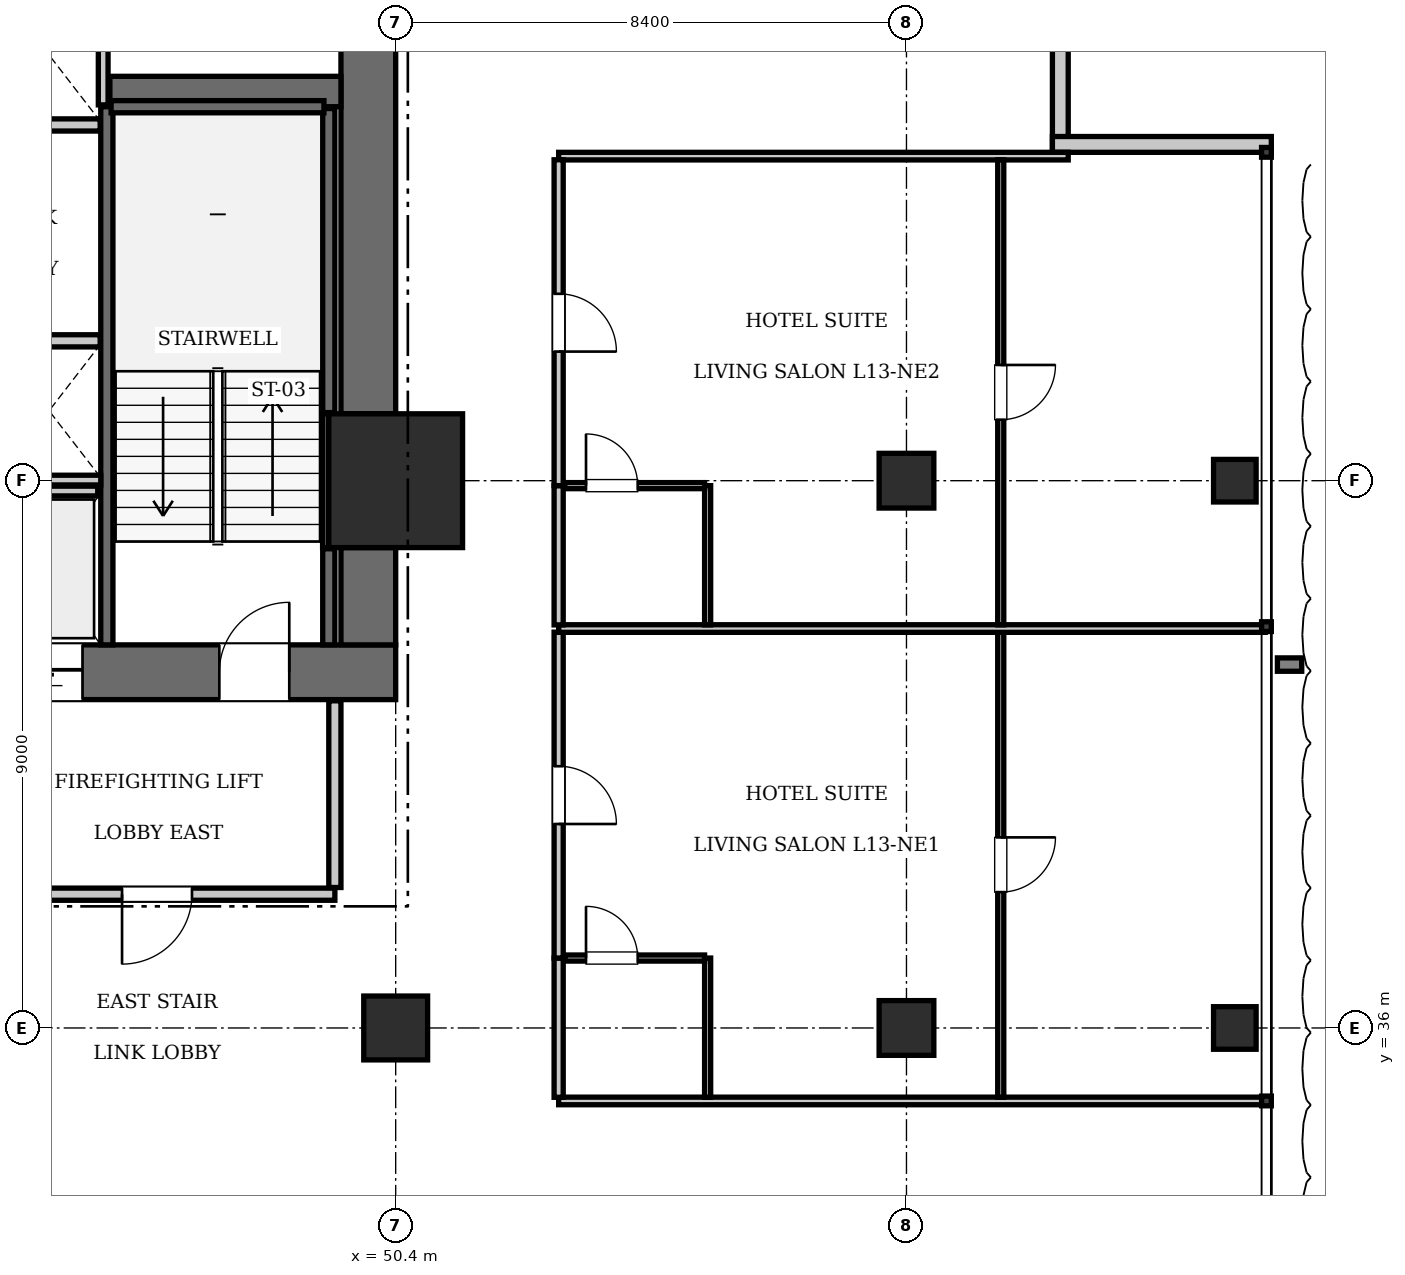
"""IFC4 building model, lengths in metres.
Left out: names, types, materials, properties, quantities, classifications, styles, units other than length and angle.
Written with IfcOpenShell. Run it as: python <this file> out.ifc"""

import sys

from ifc_helpers import new_model, si_unit, direction, frame, frame_2d, origin, origin_2d, place, context, subcontext, project, spatial, rectangle, i_section, extrude, element, fill, save


model = new_model("IFC4")
c1 = context("Model", 3, precision=1e-05, world=origin(), true_north=direction((0.0, 1.0)))
c2 = subcontext(c1, "Body", "Model", "MODEL_VIEW")
j1 = project(units=[si_unit("LENGTHUNIT", "METRE"), si_unit("PLANEANGLEUNIT", "RADIAN")], contexts=[c1])
p1 = place(None, origin())
s1 = spatial("IfcSite", under=j1, at=p1, CompositionType="ELEMENT")
p2 = place(p1, origin())
s2 = spatial("IfcBuilding", under=s1, at=p2, CompositionType="ELEMENT")
p3 = place(p2, frame((0.0, 0.0, 57.75)))
s3 = spatial("IfcBuildingStorey", under=s2, at=p3, CompositionType="ELEMENT", Elevation=57.75)
p4 = place(p3, frame((50.4, 45.0, 0.0), z_axis=(0.0, 0.0, 1.0), x_axis=(1.0, 0.0, 0.0)))
e1 = element("IfcColumn", 1, at=p4, inside=s3, PredefinedType="COLUMN", context=c2, shape_type="SweptSolid", body=[
    extrude(rectangle(XDim=2.2, YDim=2.2, at=origin_2d()), origin(), (0.0, 0.0, 1.0), 3.85),
])
p5 = place(p3, frame((43.6, 41.85, 0.0), z_axis=(0.0, 0.0, 1.0), x_axis=(1.0, 0.0, 0.0)))
e2 = element("IfcWall", 2, at=p5, inside=s3, PredefinedType="SHEAR", context=c2, shape_type="SweptSolid", body=[
    extrude(rectangle(XDim=6.8, YDim=0.9, at=frame_2d((3.4, 0.0))), origin(), (0.0, 0.0, 1.0), 3.85),
])
p6 = place(p5, frame((3.9, 0.0, 0.0)))
e3 = element("IfcOpeningElement", 3, at=p6, cuts=e2, PredefinedType="OPENING", context=c2, shape_type="SweptSolid", body=[
    extrude(rectangle(XDim=1.15, YDim=2.15, at=frame_2d((0.575, 1.075))), frame((0.0, 0.46, 0.0), z_axis=(0.0, -1.0, 0.0), x_axis=(1.0, 0.0, 0.0)), (0.0, 0.0, 1.0), 0.92),
])
p7 = place(p5, frame((0.55, 0.0, 0.0)))
e4 = element("IfcOpeningElement", 4, at=p7, cuts=e2, PredefinedType="OPENING", context=c2, shape_type="SweptSolid", body=[
    extrude(rectangle(XDim=1.1, YDim=2.2, at=frame_2d((0.55, 1.1))), frame((0.0, 0.46, 0.0), z_axis=(0.0, -1.0, 0.0), x_axis=(1.0, 0.0, 0.0)), (0.0, 0.0, 1.0), 0.92),
])
p8 = place(p3, frame((49.95, 42.3, 0.0), z_axis=(0.0, 0.0, 1.0), x_axis=(0.0, 1.0, 0.0)))
e5 = element("IfcWall", 5, at=p8, inside=s3, PredefinedType="SHEAR", context=c2, shape_type="SweptSolid", body=[
    extrude(rectangle(XDim=1.6, YDim=0.9, at=frame_2d((0.8, 0.0))), origin(), (0.0, 0.0, 1.0), 3.85),
])
p9 = place(p3, frame((49.95, 46.1, 0.0), z_axis=(0.0, 0.0, 1.0), x_axis=(0.0, 1.0, 0.0)))
e6 = element("IfcWall", 6, at=p9, inside=s3, PredefinedType="SHEAR", context=c2, shape_type="SweptSolid", body=[
    extrude(rectangle(XDim=7.0, YDim=0.9, at=frame_2d((3.5, 0.0))), origin(), (0.0, 0.0, 1.0), 3.85),
])
p10 = place(p3, frame((45.7, 51.4, 0.0), z_axis=(0.0, 0.0, 1.0), x_axis=(1.0, 0.0, 0.0)))
e7 = element("IfcWall", 7, at=p10, inside=s3, PredefinedType="SHEAR", context=c2, shape_type="SweptSolid", body=[
    extrude(rectangle(XDim=3.8, YDim=0.5, at=frame_2d((1.9, 0.0))), origin(), (0.0, 0.0, 1.0), 3.85),
])
p11 = place(p3, frame((50.4, 36.0, 0.0), z_axis=(0.0, 0.0, 1.0), x_axis=(1.0, 0.0, 0.0)))
e8 = element("IfcColumn", 8, at=p11, inside=s3, PredefinedType="COLUMN", context=c2, shape_type="SweptSolid", body=[
    extrude(rectangle(XDim=1.05, YDim=1.05, at=origin_2d()), origin(), (0.0, 0.0, 1.0), 3.85),
])
for number, where, z_axis, x_axis in (
    (9, (58.8, 36.0, 0.0), (0.0, 0.0, 1.0), (1.0, 0.0, 0.0)),
    (10, (58.8, 45.0, 0.0), (0.0, 0.0, 1.0), (1.0, 0.0, 0.0)),
):
    element("IfcColumn", number, at=place(p3, frame(where, z_axis=z_axis, x_axis=x_axis)), inside=s3, PredefinedType="COLUMN", context=c2, shape_type="SweptSolid", body=[
        extrude(rectangle(XDim=0.9, YDim=0.9, at=origin_2d()), origin(), (0.0, 0.0, 1.0), 3.85),
    ])
for number, where, z_axis, x_axis in (
    (11, (64.2, 36.0, 0.0), (0.0, 0.0, 1.0), (1.0, 0.0, 0.0)),
    (12, (64.2, 45.0, 0.0), (0.0, 0.0, 1.0), (1.0, 0.0, 0.0)),
):
    element("IfcColumn", number, at=place(p3, frame(where, z_axis=z_axis, x_axis=x_axis)), inside=s3, PredefinedType="COLUMN", context=c2, shape_type="SweptSolid", body=[
        extrude(i_section(OverallWidth=0.7, OverallDepth=0.7, WebThickness=0.028, FlangeThickness=0.044, at=origin_2d()), origin(), (0.0, 0.0, 1.0), 3.85),
    ])
p12 = place(p3, frame((45.65, 42.3, 0.0), z_axis=(0.0, 0.0, 1.0), x_axis=(0.0, 1.0, 0.0)))
e13 = element("IfcWall", 13, at=p12, inside=s3, PredefinedType="SOLIDWALL", context=c2, shape_type="SweptSolid", body=[
    extrude(rectangle(XDim=8.85, YDim=0.2, at=frame_2d((4.425, 0.0))), origin(), (0.0, 0.0, 1.0), 3.61),
])
p13 = place(p3, frame((49.3, 42.3, 0.0), z_axis=(0.0, 0.0, 1.0), x_axis=(0.0, 1.0, 0.0)))
e14 = element("IfcWall", 14, at=p13, inside=s3, PredefinedType="SOLIDWALL", context=c2, shape_type="SweptSolid", body=[
    extrude(rectangle(XDim=1.58, YDim=0.2, at=frame_2d((0.79, 0.0))), origin(), (0.0, 0.0, 1.0), 3.61),
])
p14 = place(p3, frame((49.3, 46.12, 0.0), z_axis=(0.0, 0.0, 1.0), x_axis=(0.0, 1.0, 0.0)))
e15 = element("IfcWall", 15, at=p14, inside=s3, PredefinedType="SOLIDWALL", context=c2, shape_type="SweptSolid", body=[
    extrude(rectangle(XDim=5.0, YDim=0.2, at=frame_2d((2.5, 0.0))), origin(), (0.0, 0.0, 1.0), 3.61),
])
p15 = place(p3, frame((45.72, 51.15, 0.0), z_axis=(0.0, 0.0, 1.0), x_axis=(1.0, 0.0, 0.0)))
e16 = element("IfcWall", 16, at=p15, inside=s3, PredefinedType="SOLIDWALL", context=c2, shape_type="SweptSolid", body=[
    extrude(rectangle(XDim=3.5, YDim=0.2, at=frame_2d((1.75, 0.0))), origin(), (0.0, 0.0, 1.0), 3.61),
])
p16 = place(p3, frame((49.248, 43.9, 0.0), z_axis=(0.0, 0.0, 1.0), x_axis=(0.0, 1.0, 0.0)))
e17 = element("IfcWall", 17, at=p16, inside=s3, PredefinedType="SOLIDWALL", context=c2, shape_type="SweptSolid", body=[
    extrude(rectangle(XDim=2.2, YDim=0.1, at=frame_2d((1.1, 0.0))), origin(), (0.0, 0.0, 1.0), 3.61),
])
for number, where, z_axis, x_axis in (
    (18, (43.86, 47.3, 0.0), (0.0, 0.0, 1.0), (1.0, 0.0, 0.0)),
    (19, (43.86, 50.85, 0.0), (0.0, 0.0, 1.0), (1.0, 0.0, 0.0)),
):
    element("IfcWall", number, at=place(p3, frame(where, z_axis=z_axis, x_axis=x_axis)), inside=s3, PredefinedType="SOLIDWALL", context=c2, shape_type="SweptSolid", body=[
        extrude(rectangle(XDim=1.68, YDim=0.2, at=frame_2d((0.84, 0.0))), origin(), (0.0, 0.0, 1.0), 3.61),
    ])
p17 = place(p3, frame((43.9, 44.83, 0.0), z_axis=(0.0, 0.0, 1.0), x_axis=(1.0, 0.0, 0.0)))
e20 = element("IfcWall", 20, at=p17, inside=s3, PredefinedType="SOLIDWALL", context=c2, shape_type="SweptSolid", body=[
    extrude(rectangle(XDim=1.6, YDim=0.16, at=frame_2d((0.8, 0.0))), origin(), (0.0, 0.0, 1.0), 3.61),
])
p18 = place(p3, frame((42.1, 45.01, 0.0), z_axis=(0.0, 0.0, 1.0), x_axis=(1.0, 0.0, 0.0)))
e21 = element("IfcWall", 21, at=p18, inside=s3, PredefinedType="SOLIDWALL", context=c2, shape_type="SweptSolid", body=[
    extrude(rectangle(XDim=3.45, YDim=0.16, at=frame_2d((1.725, 0.0))), origin(), (0.0, 0.0, 1.0), 3.61),
])
p19 = place(p3, frame((45.59, 51.18, 0.0), z_axis=(0.0, 0.0, 1.0), x_axis=(0.0, 1.0, 0.0)))
e22 = element("IfcWall", 22, at=p19, inside=s3, PredefinedType="SOLIDWALL", context=c2, shape_type="SweptSolid", body=[
    extrude(rectangle(XDim=1.92, YDim=0.16, at=frame_2d((0.96, 0.0))), origin(), (0.0, 0.0, 1.0), 3.61),
])
for number, where, z_axis, x_axis in (
    (23, (61.33, 54.0, 0.0), (0.0, 0.0, 1.0), (0.0, -1.0, 0.0)),
    (24, (61.2, 50.53, 0.0), (0.0, 0.0, 1.0), (1.0, 0.0, 0.0)),
):
    element("IfcWall", number, at=place(p3, frame(where, z_axis=z_axis, x_axis=x_axis)), inside=s3, PredefinedType="SOLIDWALL", context=c2, shape_type="SweptSolid", body=[
        extrude(rectangle(XDim=3.6, YDim=0.26, at=frame_2d((1.8, 0.0))), origin(), (0.0, 0.0, 1.0), 3.61),
    ])
p20 = place(p3, frame((43.6, 38.2, 0.0), z_axis=(0.0, 0.0, 1.0), x_axis=(1.0, 0.0, 0.0)))
e25 = element("IfcWall", 25, at=p20, inside=s3, PredefinedType="PARTITIONING", context=c2, shape_type="SweptSolid", body=[
    extrude(rectangle(XDim=5.8, YDim=0.2, at=frame_2d((2.9, 0.0))), origin(), (0.0, 0.0, 1.0), 3.61),
])
p21 = place(p20, frame((2.3, 0.0, 0.0)))
e26 = element("IfcOpeningElement", 26, at=p21, cuts=e25, PredefinedType="OPENING", context=c2, shape_type="SweptSolid", body=[
    extrude(rectangle(XDim=1.15, YDim=2.15, at=frame_2d((0.575, 1.075))), frame((0.0, 0.11, 0.0), z_axis=(0.0, -1.0, 0.0), x_axis=(1.0, 0.0, 0.0)), (0.0, 0.0, 1.0), 0.22),
])
p22 = place(p3, frame((49.4, 38.31, 0.0), z_axis=(0.0, 0.0, 1.0), x_axis=(0.0, 1.0, 0.0)))
e27 = element("IfcWall", 27, at=p22, inside=s3, PredefinedType="PARTITIONING", context=c2, shape_type="SweptSolid", body=[
    extrude(rectangle(XDim=3.07, YDim=0.2, at=frame_2d((1.535, 0.0))), origin(), (0.0, 0.0, 1.0), 3.61),
])
p23 = place(p3, frame((53.08, 34.8, 0.0), z_axis=(0.0, 0.0, 1.0), x_axis=(1.0, 0.0, 0.0)))
e28 = element("IfcWall", 28, at=p23, inside=s3, PredefinedType="PARTITIONING", context=c2, shape_type="SweptSolid", body=[
    extrude(rectangle(XDim=11.62, YDim=0.125, at=frame_2d((5.81, 0.0))), origin(), (0.0, 0.0, 1.0), 3.61),
])
p24 = place(p3, frame((53.08, 50.337, 0.0), z_axis=(0.0, 0.0, 1.0), x_axis=(1.0, 0.0, 0.0)))
e29 = element("IfcWall", 29, at=p24, inside=s3, PredefinedType="PARTITIONING", context=c2, shape_type="SweptSolid", body=[
    extrude(rectangle(XDim=8.38, YDim=0.125, at=frame_2d((4.19, 0.0))), origin(), (0.0, 0.0, 1.0), 3.61),
])
p25 = place(p3, frame((53.08, 34.86, 0.0), z_axis=(0.0, 0.0, 1.0), x_axis=(0.0, 1.0, 0.0)))
e30 = element("IfcWall", 30, at=p25, inside=s3, PredefinedType="PARTITIONING", context=c2, shape_type="SweptSolid", body=[
    extrude(rectangle(XDim=2.29, YDim=0.15, at=frame_2d((1.145, 0.0))), origin(), (0.0, 0.0, 1.0), 3.61),
])
p26 = place(p3, frame((53.08, 37.15, 0.0), z_axis=(0.0, 0.0, 1.0), x_axis=(0.0, 1.0, 0.0)))
e31 = element("IfcWall", 31, at=p26, inside=s3, PredefinedType="PARTITIONING", context=c2, shape_type="SweptSolid", body=[
    extrude(rectangle(XDim=5.359, YDim=0.15, at=frame_2d((2.679, 0.0))), origin(), (0.0, 0.0, 1.0), 3.61),
])
p27 = place(p26, frame((2.204, 0.0, 0.0)))
e32 = element("IfcOpeningElement", 32, at=p27, cuts=e31, PredefinedType="OPENING", context=c2, shape_type="SweptSolid", body=[
    extrude(rectangle(XDim=0.95, YDim=2.15, at=frame_2d((0.475, 1.075))), frame((0.0, 0.085, 0.0), z_axis=(0.0, -1.0, 0.0), x_axis=(1.0, 0.0, 0.0)), (0.0, 0.0, 1.0), 0.17),
])
p28 = place(p3, frame((55.53, 34.86, 0.0), z_axis=(0.0, 0.0, 1.0), x_axis=(0.0, 1.0, 0.0)))
e33 = element("IfcWall", 33, at=p28, inside=s3, PredefinedType="PARTITIONING", context=c2, shape_type="SweptSolid", body=[
    extrude(rectangle(XDim=2.29, YDim=0.1, at=frame_2d((1.145, 0.0))), origin(), (0.0, 0.0, 1.0), 3.61),
])
p29 = place(p3, frame((53.18, 37.15, 0.0), z_axis=(0.0, 0.0, 1.0), x_axis=(1.0, 0.0, 0.0)))
e34 = element("IfcWall", 34, at=p29, inside=s3, PredefinedType="PARTITIONING", context=c2, shape_type="SweptSolid", body=[
    extrude(rectangle(XDim=2.3, YDim=0.1, at=frame_2d((1.15, 0.0))), origin(), (0.0, 0.0, 1.0), 3.61),
])
p30 = place(p29, frame((0.35, 0.0, 0.0)))
e35 = element("IfcOpeningElement", 35, at=p30, cuts=e34, PredefinedType="OPENING", context=c2, shape_type="SweptSolid", body=[
    extrude(rectangle(XDim=0.85, YDim=2.1, at=frame_2d((0.425, 1.05))), frame((0.0, 0.06, 0.0), z_axis=(0.0, -1.0, 0.0), x_axis=(1.0, 0.0, 0.0)), (0.0, 0.0, 1.0), 0.12),
])
p31 = place(p3, frame((60.35, 34.86, 0.0), z_axis=(0.0, 0.0, 1.0), x_axis=(0.0, 1.0, 0.0)))
e36 = element("IfcWall", 36, at=p31, inside=s3, PredefinedType="PARTITIONING", context=c2, shape_type="SweptSolid", body=[
    extrude(rectangle(XDim=7.649, YDim=0.1, at=frame_2d((3.824, 0.0))), origin(), (0.0, 0.0, 1.0), 3.61),
])
p32 = place(p31, frame((3.374, 0.0, 0.0)))
e37 = element("IfcOpeningElement", 37, at=p32, cuts=e36, PredefinedType="OPENING", context=c2, shape_type="SweptSolid", body=[
    extrude(rectangle(XDim=0.9, YDim=2.1, at=frame_2d((0.45, 1.05))), frame((0.0, 0.06, 0.0), z_axis=(0.0, -1.0, 0.0), x_axis=(1.0, 0.0, 0.0)), (0.0, 0.0, 1.0), 0.12),
])
p33 = place(p3, frame((53.08, 42.569, 0.0), z_axis=(0.0, 0.0, 1.0), x_axis=(1.0, 0.0, 0.0)))
e38 = element("IfcWall", 38, at=p33, inside=s3, PredefinedType="PARTITIONING", context=c2, shape_type="SweptSolid", body=[
    extrude(rectangle(XDim=11.62, YDim=0.125, at=frame_2d((5.81, 0.0))), origin(), (0.0, 0.0, 1.0), 3.61),
])
p34 = place(p3, frame((53.08, 42.629, 0.0), z_axis=(0.0, 0.0, 1.0), x_axis=(0.0, 1.0, 0.0)))
e39 = element("IfcWall", 39, at=p34, inside=s3, PredefinedType="PARTITIONING", context=c2, shape_type="SweptSolid", body=[
    extrude(rectangle(XDim=2.29, YDim=0.15, at=frame_2d((1.145, 0.0))), origin(), (0.0, 0.0, 1.0), 3.61),
])
p35 = place(p3, frame((53.08, 44.919, 0.0), z_axis=(0.0, 0.0, 1.0), x_axis=(0.0, 1.0, 0.0)))
e40 = element("IfcWall", 40, at=p35, inside=s3, PredefinedType="PARTITIONING", context=c2, shape_type="SweptSolid", body=[
    extrude(rectangle(XDim=5.359, YDim=0.15, at=frame_2d((2.679, 0.0))), origin(), (0.0, 0.0, 1.0), 3.61),
])
p36 = place(p35, frame((2.204, 0.0, 0.0)))
e41 = element("IfcOpeningElement", 41, at=p36, cuts=e40, PredefinedType="OPENING", context=c2, shape_type="SweptSolid", body=[
    extrude(rectangle(XDim=0.95, YDim=2.15, at=frame_2d((0.475, 1.075))), frame((0.0, 0.085, 0.0), z_axis=(0.0, -1.0, 0.0), x_axis=(1.0, 0.0, 0.0)), (0.0, 0.0, 1.0), 0.17),
])
p37 = place(p3, frame((55.53, 42.629, 0.0), z_axis=(0.0, 0.0, 1.0), x_axis=(0.0, 1.0, 0.0)))
e42 = element("IfcWall", 42, at=p37, inside=s3, PredefinedType="PARTITIONING", context=c2, shape_type="SweptSolid", body=[
    extrude(rectangle(XDim=2.29, YDim=0.1, at=frame_2d((1.145, 0.0))), origin(), (0.0, 0.0, 1.0), 3.61),
])
p38 = place(p3, frame((53.18, 44.919, 0.0), z_axis=(0.0, 0.0, 1.0), x_axis=(1.0, 0.0, 0.0)))
e43 = element("IfcWall", 43, at=p38, inside=s3, PredefinedType="PARTITIONING", context=c2, shape_type="SweptSolid", body=[
    extrude(rectangle(XDim=2.3, YDim=0.1, at=frame_2d((1.15, 0.0))), origin(), (0.0, 0.0, 1.0), 2.988),
])
p39 = place(p38, frame((0.35, 0.0, 0.0)))
e44 = element("IfcOpeningElement", 44, at=p39, cuts=e43, PredefinedType="OPENING", context=c2, shape_type="SweptSolid", body=[
    extrude(rectangle(XDim=0.85, YDim=2.1, at=frame_2d((0.425, 1.05))), frame((0.0, 0.06, 0.0), z_axis=(0.0, -1.0, 0.0), x_axis=(1.0, 0.0, 0.0)), (0.0, 0.0, 1.0), 0.12),
])
p40 = place(p3, frame((60.35, 42.629, 0.0), z_axis=(0.0, 0.0, 1.0), x_axis=(0.0, 1.0, 0.0)))
e45 = element("IfcWall", 45, at=p40, inside=s3, PredefinedType="PARTITIONING", context=c2, shape_type="SweptSolid", body=[
    extrude(rectangle(XDim=7.649, YDim=0.1, at=frame_2d((3.824, 0.0))), origin(), (0.0, 0.0, 1.0), 3.61),
])
p41 = place(p40, frame((3.375, 0.0, 0.0)))
e46 = element("IfcOpeningElement", 46, at=p41, cuts=e45, PredefinedType="OPENING", context=c2, shape_type="SweptSolid", body=[
    extrude(rectangle(XDim=0.9, YDim=2.1, at=frame_2d((0.45, 1.05))), frame((0.0, 0.06, 0.0), z_axis=(0.0, -1.0, 0.0), x_axis=(1.0, 0.0, 0.0)), (0.0, 0.0, 1.0), 0.12),
])
p42 = place(p6, origin())
e47 = element("IfcDoor", 47, at=p42, inside=s3, OperationType="SINGLE_SWING_RIGHT", PredefinedType="DOOR", context=c2, shape_type="SweptSolid", body=[
    extrude(rectangle(XDim=1.15, YDim=2.15, at=frame_2d((0.575, 1.075))), frame((0.0, 0.025, 0.0), z_axis=(0.0, -1.0, 0.0), x_axis=(1.0, 0.0, 0.0)), (0.0, 0.0, 1.0), 0.05),
])
fill(e3, e47)
p43 = place(p7, frame((1.1, 0.0, 0.0), z_axis=(0.0, 0.0, 1.0), x_axis=(-1.0, 0.0, 0.0)))
e48 = element("IfcDoor", 48, at=p43, inside=s3, OperationType="SLIDING_TO_LEFT", PredefinedType="DOOR", context=c2, shape_type="SweptSolid", body=[
    extrude(rectangle(XDim=1.1, YDim=2.2, at=frame_2d((0.55, 1.1))), frame((0.0, 0.025, 0.0), z_axis=(0.0, -1.0, 0.0), x_axis=(1.0, 0.0, 0.0)), (0.0, 0.0, 1.0), 0.05),
])
fill(e4, e48)
p44 = place(p21, frame((1.15, 0.0, 0.0), z_axis=(0.0, 0.0, 1.0), x_axis=(-1.0, 0.0, 0.0)))
e49 = element("IfcDoor", 49, at=p44, inside=s3, OperationType="SINGLE_SWING_RIGHT", PredefinedType="DOOR", context=c2, shape_type="SweptSolid", body=[
    extrude(rectangle(XDim=1.15, YDim=2.15, at=frame_2d((0.575, 1.075))), frame((0.0, 0.025, 0.0), z_axis=(0.0, -1.0, 0.0), x_axis=(1.0, 0.0, 0.0)), (0.0, 0.0, 1.0), 0.05),
])
fill(e26, e49)
p45 = place(p30, origin())
e50 = element("IfcDoor", 50, at=p45, inside=s3, OperationType="SINGLE_SWING_LEFT", PredefinedType="DOOR", context=c2, shape_type="SweptSolid", body=[
    extrude(rectangle(XDim=0.85, YDim=2.1, at=frame_2d((0.425, 1.05))), frame((0.0, 0.025, 0.0), z_axis=(0.0, -1.0, 0.0), x_axis=(1.0, 0.0, 0.0)), (0.0, 0.0, 1.0), 0.05),
])
fill(e35, e50)
p46 = place(p27, frame((0.95, 0.0, 0.0), z_axis=(0.0, 0.0, 1.0), x_axis=(-1.0, 0.0, 0.0)))
e51 = element("IfcDoor", 51, at=p46, inside=s3, OperationType="SINGLE_SWING_RIGHT", PredefinedType="DOOR", context=c2, shape_type="SweptSolid", body=[
    extrude(rectangle(XDim=0.95, YDim=2.15, at=frame_2d((0.475, 1.075))), frame((0.0, 0.025, 0.0), z_axis=(0.0, -1.0, 0.0), x_axis=(1.0, 0.0, 0.0)), (0.0, 0.0, 1.0), 0.05),
])
fill(e32, e51)
p47 = place(p32, frame((0.9, 0.0, 0.0), z_axis=(0.0, 0.0, 1.0), x_axis=(-1.0, 0.0, 0.0)))
e52 = element("IfcDoor", 52, at=p47, inside=s3, OperationType="SINGLE_SWING_LEFT", PredefinedType="DOOR", context=c2, shape_type="SweptSolid", body=[
    extrude(rectangle(XDim=0.9, YDim=2.1, at=frame_2d((0.45, 1.05))), frame((0.0, 0.025, 0.0), z_axis=(0.0, -1.0, 0.0), x_axis=(1.0, 0.0, 0.0)), (0.0, 0.0, 1.0), 0.05),
])
fill(e37, e52)
p48 = place(p39, origin())
e53 = element("IfcDoor", 53, at=p48, inside=s3, OperationType="SINGLE_SWING_LEFT", PredefinedType="DOOR", context=c2, shape_type="SweptSolid", body=[
    extrude(rectangle(XDim=0.85, YDim=2.1, at=frame_2d((0.425, 1.05))), frame((0.0, 0.025, 0.0), z_axis=(0.0, -1.0, 0.0), x_axis=(1.0, 0.0, 0.0)), (0.0, 0.0, 1.0), 0.05),
])
fill(e44, e53)
p49 = place(p36, frame((0.95, 0.0, 0.0), z_axis=(0.0, 0.0, 1.0), x_axis=(-1.0, 0.0, 0.0)))
e54 = element("IfcDoor", 54, at=p49, inside=s3, OperationType="SINGLE_SWING_RIGHT", PredefinedType="DOOR", context=c2, shape_type="SweptSolid", body=[
    extrude(rectangle(XDim=0.95, YDim=2.15, at=frame_2d((0.475, 1.075))), frame((0.0, 0.025, 0.0), z_axis=(0.0, -1.0, 0.0), x_axis=(1.0, 0.0, 0.0)), (0.0, 0.0, 1.0), 0.05),
])
fill(e41, e54)
p50 = place(p41, frame((0.9, 0.0, 0.0), z_axis=(0.0, 0.0, 1.0), x_axis=(-1.0, 0.0, 0.0)))
e55 = element("IfcDoor", 55, at=p50, inside=s3, OperationType="SINGLE_SWING_LEFT", PredefinedType="DOOR", context=c2, shape_type="SweptSolid", body=[
    extrude(rectangle(XDim=0.9, YDim=2.1, at=frame_2d((0.45, 1.05))), frame((0.0, 0.025, 0.0), z_axis=(0.0, -1.0, 0.0), x_axis=(1.0, 0.0, 0.0)), (0.0, 0.0, 1.0), 0.05),
])
fill(e46, e55)
save(model, sys.argv[1])
